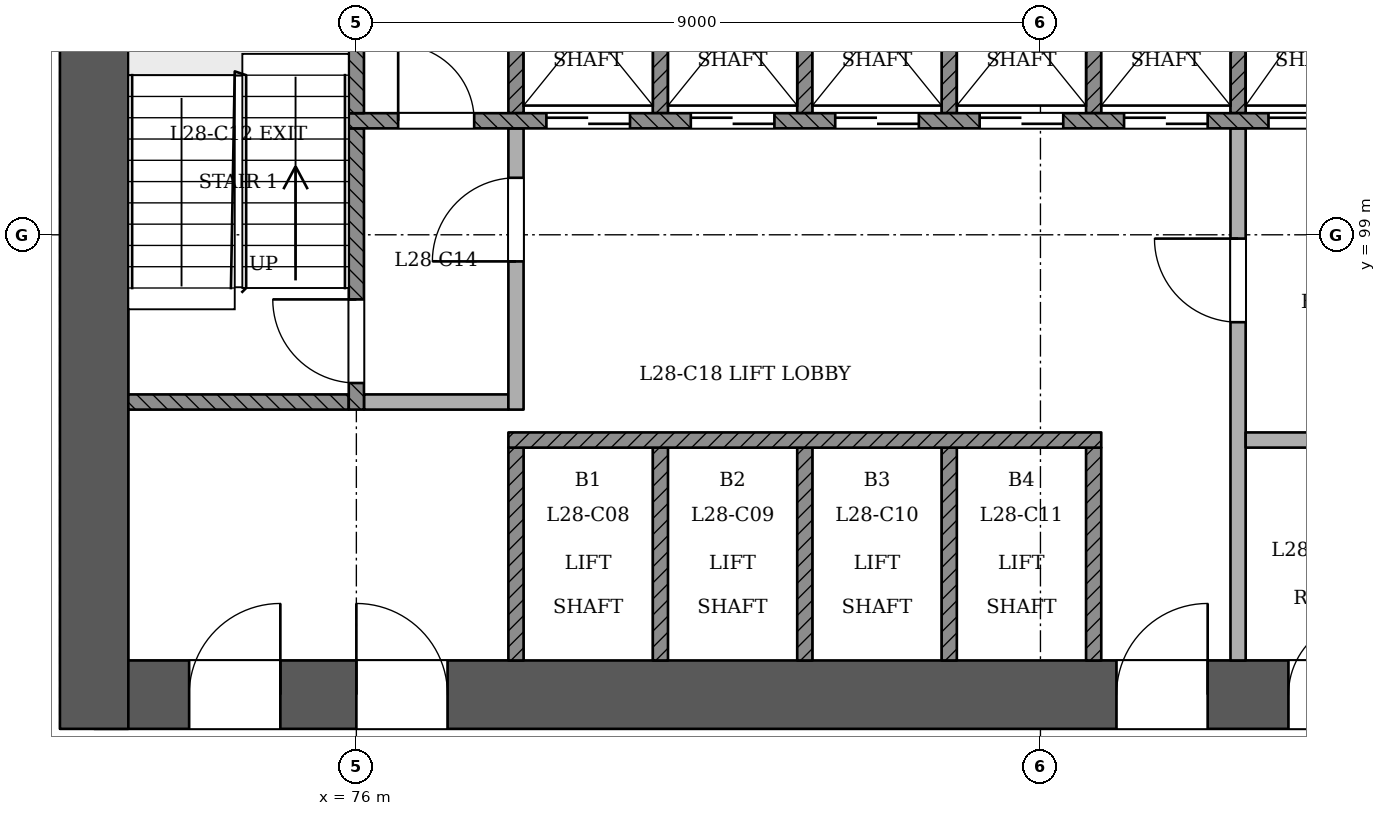
"""IFC4 building model, lengths in metres.
Left out: names, types, materials, properties, quantities, classifications, styles, units other than length and angle.
Written with IfcOpenShell. Run it as: python <this file> out.ifc"""

import sys

from ifc_helpers import new_model, si_unit, direction, frame, frame_2d, origin, place, context, subcontext, project, spatial, rectangle, extrude, element, fill, save


model = new_model("IFC4")
c1 = context("Model", 3, precision=1e-05, world=origin(), true_north=direction((0.0, 1.0)))
c2 = subcontext(c1, "Body", "Model", "MODEL_VIEW")
j1 = project(units=[si_unit("LENGTHUNIT", "METRE"), si_unit("PLANEANGLEUNIT", "RADIAN")], contexts=[c1])
p1 = place(None, origin())
s1 = spatial("IfcSite", under=j1, at=p1, CompositionType="ELEMENT")
p2 = place(p1, origin())
s2 = spatial("IfcBuilding", under=s1, at=p2, CompositionType="ELEMENT")
p3 = place(p2, frame((0.0, 0.0, 111.6)))
s3 = spatial("IfcBuildingStorey", under=s2, at=p3, CompositionType="ELEMENT", Elevation=111.6)
p4 = place(p3, frame((72.55, 92.95, 0.0), z_axis=(0.0, 0.0, 1.0), x_axis=(1.0, 0.0, 0.0)))
e1 = element("IfcWall", 1, at=p4, inside=s3, PredefinedType="SHEAR", context=c2, shape_type="SweptSolid", body=[
    extrude(rectangle(XDim=25.35, YDim=0.9, at=frame_2d((12.675, 0.0))), origin(), (0.0, 0.0, 1.0), 3.6),
])
p5 = place(p4, frame((1.25, 0.0, 0.0)))
e2 = element("IfcOpeningElement", 2, at=p5, cuts=e1, PredefinedType="OPENING", context=c2, shape_type="SweptSolid", body=[
    extrude(rectangle(XDim=1.2, YDim=2.1, at=frame_2d((0.6, 1.05))), frame((0.0, 0.46, 0.0), z_axis=(0.0, -1.0, 0.0), x_axis=(1.0, 0.0, 0.0)), (0.0, 0.0, 1.0), 0.921),
])
p6 = place(p4, frame((3.45, 0.0, 0.0)))
e3 = element("IfcOpeningElement", 3, at=p6, cuts=e1, PredefinedType="OPENING", context=c2, shape_type="SweptSolid", body=[
    extrude(rectangle(XDim=1.2, YDim=2.1, at=frame_2d((0.6, 1.05))), frame((0.0, 0.46, 0.0), z_axis=(0.0, -1.0, 0.0), x_axis=(1.0, 0.0, 0.0)), (0.0, 0.0, 1.0), 0.921),
])
p7 = place(p4, frame((13.45, 0.0, 0.0)))
e4 = element("IfcOpeningElement", 4, at=p7, cuts=e1, PredefinedType="OPENING", context=c2, shape_type="SweptSolid", body=[
    extrude(rectangle(XDim=1.2, YDim=2.1, at=frame_2d((0.6, 1.05))), frame((0.0, 0.46, 0.0), z_axis=(0.0, -1.0, 0.0), x_axis=(1.0, 0.0, 0.0)), (0.0, 0.0, 1.0), 0.921),
])
p8 = place(p4, frame((15.712, 0.0, 0.0)))
e5 = element("IfcOpeningElement", 5, at=p8, cuts=e1, PredefinedType="OPENING", context=c2, shape_type="SweptSolid", body=[
    extrude(rectangle(XDim=1.0, YDim=2.1, at=frame_2d((0.5, 1.05))), frame((0.0, 0.46, 0.0), z_axis=(0.0, -1.0, 0.0), x_axis=(1.0, 0.0, 0.0)), (0.0, 0.0, 1.0), 0.921),
])
p9 = place(p4, frame((18.35, 0.0, 0.0)))
e6 = element("IfcOpeningElement", 6, at=p9, cuts=e1, PredefinedType="OPENING", context=c2, shape_type="SweptSolid", body=[
    extrude(rectangle(XDim=1.0, YDim=2.1, at=frame_2d((0.5, 1.05))), frame((0.0, 0.46, 0.0), z_axis=(0.0, -1.0, 0.0), x_axis=(1.0, 0.0, 0.0)), (0.0, 0.0, 1.0), 0.921),
])
p10 = place(p4, frame((21.938, 0.0, 0.0)))
e7 = element("IfcOpeningElement", 7, at=p10, cuts=e1, PredefinedType="OPENING", context=c2, shape_type="SweptSolid", body=[
    extrude(rectangle(XDim=1.0, YDim=2.1, at=frame_2d((0.5, 1.05))), frame((0.0, 0.46, 0.0), z_axis=(0.0, -1.0, 0.0), x_axis=(1.0, 0.0, 0.0)), (0.0, 0.0, 1.0), 0.921),
])
p11 = place(p3, frame((72.55, 103.85, 0.0), z_axis=(0.0, 0.0, 1.0), x_axis=(0.0, -1.0, 0.0)))
e8 = element("IfcWall", 8, at=p11, inside=s3, PredefinedType="SHEAR", context=c2, shape_type="SweptSolid", body=[
    extrude(rectangle(XDim=11.35, YDim=0.9, at=frame_2d((5.675, 0.0))), origin(), (0.0, 0.0, 1.0), 3.6),
])
p12 = place(p3, frame((63.988, 97.906, 0.0), z_axis=(0.0, 0.0, 1.0), x_axis=(0.500001579174, -0.866024492046, 0.0)))
e9 = element("IfcWall", 9, at=p12, inside=s3, PredefinedType="PARTITIONING", context=c2, shape_type="SweptSolid", body=[
    extrude(rectangle(XDim=41.339, YDim=0.15, at=frame_2d((20.669, 0.0))), origin(), (0.0, 0.0, 1.0), 2.7),
])
p13 = place(p12, frame((0.228, 0.0, 0.0)))
e10 = element("IfcOpeningElement", 10, at=p13, cuts=e9, PredefinedType="OPENING", context=c2, shape_type="SweptSolid", body=[
    extrude(rectangle(XDim=1.2, YDim=2.1, at=frame_2d((0.6, 1.05))), frame((0.0, 0.085, 0.0), z_axis=(0.0, -1.0, 0.0), x_axis=(1.0, 0.0, 0.0)), (0.0, 0.0, 1.0), 0.171),
])
p14 = place(p12, frame((11.07, 0.0, 0.0)))
e11 = element("IfcOpeningElement", 11, at=p14, cuts=e9, PredefinedType="OPENING", context=c2, shape_type="SweptSolid", body=[
    extrude(rectangle(XDim=1.2, YDim=2.1, at=frame_2d((0.6, 1.05))), frame((0.0, 0.085, 0.0), z_axis=(0.0, -1.0, 0.0), x_axis=(1.0, 0.0, 0.0)), (0.0, 0.0, 1.0), 0.171),
])
p15 = place(p12, frame((22.32, 0.0, 0.0)))
e12 = element("IfcOpeningElement", 12, at=p15, cuts=e9, PredefinedType="OPENING", context=c2, shape_type="SweptSolid", body=[
    extrude(rectangle(XDim=1.2, YDim=2.1, at=frame_2d((0.6, 1.05))), frame((0.0, 0.085, 0.0), z_axis=(0.0, -1.0, 0.0), x_axis=(1.0, 0.0, 0.0)), (0.0, 0.0, 1.0), 0.171),
])
p16 = place(p12, frame((32.47, 0.0, 0.0)))
e13 = element("IfcOpeningElement", 13, at=p16, cuts=e9, PredefinedType="OPENING", context=c2, shape_type="SweptSolid", body=[
    extrude(rectangle(XDim=1.2, YDim=2.1, at=frame_2d((0.6, 1.05))), frame((0.0, 0.085, 0.0), z_axis=(0.0, -1.0, 0.0), x_axis=(1.0, 0.0, 0.0)), (0.0, 0.0, 1.0), 0.171),
])
p17 = place(p12, frame((39.758, 0.0, 0.0)))
e14 = element("IfcOpeningElement", 14, at=p17, cuts=e9, PredefinedType="OPENING", context=c2, shape_type="SweptSolid", body=[
    extrude(rectangle(XDim=1.0, YDim=2.1, at=frame_2d((0.5, 1.05))), frame((0.0, 0.085, 0.0), z_axis=(0.0, -1.0, 0.0), x_axis=(1.0, 0.0, 0.0)), (0.0, 0.0, 1.0), 0.171),
])
p18 = place(p3, frame((85.343, 62.105, 0.0), z_axis=(0.0, 0.0, 1.0), x_axis=(0.500001579174, 0.866024492046, 0.0)))
e15 = element("IfcWall", 15, at=p18, inside=s3, PredefinedType="PARTITIONING", context=c2, shape_type="SweptSolid", body=[
    extrude(rectangle(XDim=41.339, YDim=0.15, at=frame_2d((20.669, 0.0))), origin(), (0.0, 0.0, 1.0), 2.7),
])
p19 = place(p18, frame((0.312, 0.0, 0.0)))
e16 = element("IfcOpeningElement", 16, at=p19, cuts=e15, PredefinedType="OPENING", context=c2, shape_type="SweptSolid", body=[
    extrude(rectangle(XDim=1.2, YDim=2.1, at=frame_2d((0.6, 1.05))), frame((0.0, 0.085, 0.0), z_axis=(0.0, -1.0, 0.0), x_axis=(1.0, 0.0, 0.0)), (0.0, 0.0, 1.0), 0.171),
])
p20 = place(p18, frame((8.82, 0.0, 0.0)))
e17 = element("IfcOpeningElement", 17, at=p20, cuts=e15, PredefinedType="OPENING", context=c2, shape_type="SweptSolid", body=[
    extrude(rectangle(XDim=1.2, YDim=2.1, at=frame_2d((0.6, 1.05))), frame((0.0, 0.085, 0.0), z_axis=(0.0, -1.0, 0.0), x_axis=(1.0, 0.0, 0.0)), (0.0, 0.0, 1.0), 0.171),
])
p21 = place(p18, frame((22.32, 0.0, 0.0)))
e18 = element("IfcOpeningElement", 18, at=p21, cuts=e15, PredefinedType="OPENING", context=c2, shape_type="SweptSolid", body=[
    extrude(rectangle(XDim=1.2, YDim=2.1, at=frame_2d((0.6, 1.05))), frame((0.0, 0.085, 0.0), z_axis=(0.0, -1.0, 0.0), x_axis=(1.0, 0.0, 0.0)), (0.0, 0.0, 1.0), 0.171),
])
p22 = place(p18, frame((32.47, 0.0, 0.0)))
e19 = element("IfcOpeningElement", 19, at=p22, cuts=e15, PredefinedType="OPENING", context=c2, shape_type="SweptSolid", body=[
    extrude(rectangle(XDim=1.2, YDim=2.1, at=frame_2d((0.6, 1.05))), frame((0.0, 0.085, 0.0), z_axis=(0.0, -1.0, 0.0), x_axis=(1.0, 0.0, 0.0)), (0.0, 0.0, 1.0), 0.171),
])
p23 = place(p18, frame((39.739, 0.0, 0.0)))
e20 = element("IfcOpeningElement", 20, at=p23, cuts=e15, PredefinedType="OPENING", context=c2, shape_type="SweptSolid", body=[
    extrude(rectangle(XDim=1.0, YDim=2.1, at=frame_2d((0.5, 1.05))), frame((0.0, 0.085, 0.0), z_axis=(0.0, -1.0, 0.0), x_axis=(1.0, 0.0, 0.0)), (0.0, 0.0, 1.0), 0.171),
])
for number, where, z_axis, x_axis in (
    (21, (78.1, 93.4, 0.0), (0.0, 0.0, 1.0), (0.0, 1.0, 0.0)),
    (22, (80.0, 93.4, 0.0), (0.0, 0.0, 1.0), (0.0, 1.0, 0.0)),
    (23, (81.9, 93.4, 0.0), (0.0, 0.0, 1.0), (0.0, 1.0, 0.0)),
    (24, (83.8, 93.4, 0.0), (0.0, 0.0, 1.0), (0.0, 1.0, 0.0)),
    (25, (85.7, 93.4, 0.0), (0.0, 0.0, 1.0), (0.0, 1.0, 0.0)),
):
    element("IfcWall", number, at=place(p3, frame(where, z_axis=z_axis, x_axis=x_axis)), inside=s3, PredefinedType="SOLIDWALL", context=c2, shape_type="SweptSolid", body=[
        extrude(rectangle(XDim=2.8, YDim=0.2, at=frame_2d((1.4, 0.0))), origin(), (0.0, 0.0, 1.0), 3.1),
    ])
p24 = place(p3, frame((87.6, 93.4, 0.0), z_axis=(0.0, 0.0, 1.0), x_axis=(0.0, 1.0, 0.0)))
e26 = element("IfcWall", 26, at=p24, inside=s3, PredefinedType="PARTITIONING", context=c2, shape_type="SweptSolid", body=[
    extrude(rectangle(XDim=7.0, YDim=0.2, at=frame_2d((3.5, 0.0))), origin(), (0.0, 0.0, 1.0), 3.1),
])
p25 = place(p24, frame((4.45, 0.0, 0.0)))
e27 = element("IfcOpeningElement", 27, at=p25, cuts=e26, PredefinedType="OPENING", context=c2, shape_type="SweptSolid", body=[
    extrude(rectangle(XDim=1.1, YDim=2.1, at=frame_2d((0.55, 1.05))), frame((0.0, 0.11, 0.0), z_axis=(0.0, -1.0, 0.0), x_axis=(1.0, 0.0, 0.0)), (0.0, 0.0, 1.0), 0.221),
])
p26 = place(p3, frame((78.0, 96.3, 0.0), z_axis=(0.0, 0.0, 1.0), x_axis=(1.0, 0.0, 0.0)))
e28 = element("IfcWall", 28, at=p26, inside=s3, PredefinedType="SOLIDWALL", context=c2, shape_type="SweptSolid", body=[
    extrude(rectangle(XDim=7.8, YDim=0.2, at=frame_2d((3.9, 0.0))), origin(), (0.0, 0.0, 1.0), 3.1),
])
p27 = place(p3, frame((87.7, 96.3, 0.0), z_axis=(0.0, 0.0, 1.0), x_axis=(1.0, 0.0, 0.0)))
e29 = element("IfcWall", 29, at=p27, inside=s3, PredefinedType="PARTITIONING", context=c2, shape_type="SweptSolid", body=[
    extrude(rectangle(XDim=3.6, YDim=0.2, at=frame_2d((1.8, 0.0))), origin(), (0.0, 0.0, 1.0), 3.1),
])
p28 = place(p3, frame((73.0, 96.8, 0.0), z_axis=(0.0, 0.0, 1.0), x_axis=(1.0, 0.0, 0.0)))
e30 = element("IfcWall", 30, at=p28, inside=s3, PredefinedType="SOLIDWALL", context=c2, shape_type="SweptSolid", body=[
    extrude(rectangle(XDim=2.9, YDim=0.2, at=frame_2d((1.45, 0.0))), origin(), (0.0, 0.0, 1.0), 3.1),
])
p29 = place(p3, frame((76.0, 96.7, 0.0), z_axis=(0.0, 0.0, 1.0), x_axis=(0.0, 1.0, 0.0)))
e31 = element("IfcWall", 31, at=p29, inside=s3, PredefinedType="SOLIDWALL", context=c2, shape_type="SweptSolid", body=[
    extrude(rectangle(XDim=3.7, YDim=0.2, at=frame_2d((1.85, 0.0))), origin(), (0.0, 0.0, 1.0), 3.1),
])
p30 = place(p29, frame((0.35, 0.0, 0.0)))
e32 = element("IfcOpeningElement", 32, at=p30, cuts=e31, PredefinedType="OPENING", context=c2, shape_type="SweptSolid", body=[
    extrude(rectangle(XDim=1.1, YDim=2.1, at=frame_2d((0.55, 1.05))), frame((0.0, 0.11, 0.0), z_axis=(0.0, -1.0, 0.0), x_axis=(1.0, 0.0, 0.0)), (0.0, 0.0, 1.0), 0.221),
])
p31 = place(p3, frame((76.1, 96.8, 0.0), z_axis=(0.0, 0.0, 1.0), x_axis=(1.0, 0.0, 0.0)))
e33 = element("IfcWall", 33, at=p31, inside=s3, PredefinedType="PARTITIONING", context=c2, shape_type="SweptSolid", body=[
    extrude(rectangle(XDim=1.9, YDim=0.2, at=frame_2d((0.95, 0.0))), origin(), (0.0, 0.0, 1.0), 3.1),
])
p32 = place(p3, frame((78.1, 96.7, 0.0), z_axis=(0.0, 0.0, 1.0), x_axis=(0.0, 1.0, 0.0)))
e34 = element("IfcWall", 34, at=p32, inside=s3, PredefinedType="PARTITIONING", context=c2, shape_type="SweptSolid", body=[
    extrude(rectangle(XDim=3.7, YDim=0.2, at=frame_2d((1.85, 0.0))), origin(), (0.0, 0.0, 1.0), 3.1),
])
p33 = place(p32, frame((1.95, 0.0, 0.0)))
e35 = element("IfcOpeningElement", 35, at=p33, cuts=e34, PredefinedType="OPENING", context=c2, shape_type="SweptSolid", body=[
    extrude(rectangle(XDim=1.1, YDim=2.1, at=frame_2d((0.55, 1.05))), frame((0.0, 0.11, 0.0), z_axis=(0.0, -1.0, 0.0), x_axis=(1.0, 0.0, 0.0)), (0.0, 0.0, 1.0), 0.221),
])
p34 = place(p3, frame((75.9, 100.5, 0.0), z_axis=(0.0, 0.0, 1.0), x_axis=(1.0, 0.0, 0.0)))
e36 = element("IfcWall", 36, at=p34, inside=s3, PredefinedType="SOLIDWALL", context=c2, shape_type="SweptSolid", body=[
    extrude(rectangle(XDim=18.2, YDim=0.2, at=frame_2d((9.1, 0.0))), origin(), (0.0, 0.0, 1.0), 3.1),
])
p35 = place(p34, frame((2.6, 0.0, 0.0)))
e37 = element("IfcOpeningElement", 37, at=p35, cuts=e36, PredefinedType="OPENING", context=c2, shape_type="SweptSolid", body=[
    extrude(rectangle(XDim=1.1, YDim=2.1, at=frame_2d((0.55, 1.05))), frame((0.0, 0.11, 0.0), z_axis=(0.0, -1.0, 0.0), x_axis=(1.0, 0.0, 0.0)), (0.0, 0.0, 1.0), 0.221),
])
p36 = place(p34, frame((4.5, 0.0, 0.0)))
e38 = element("IfcOpeningElement", 38, at=p36, cuts=e36, PredefinedType="OPENING", context=c2, shape_type="SweptSolid", body=[
    extrude(rectangle(XDim=1.1, YDim=2.1, at=frame_2d((0.55, 1.05))), frame((0.0, 0.11, 0.0), z_axis=(0.0, -1.0, 0.0), x_axis=(1.0, 0.0, 0.0)), (0.0, 0.0, 1.0), 0.221),
])
p37 = place(p34, frame((6.4, 0.0, 0.0)))
e39 = element("IfcOpeningElement", 39, at=p37, cuts=e36, PredefinedType="OPENING", context=c2, shape_type="SweptSolid", body=[
    extrude(rectangle(XDim=1.1, YDim=2.1, at=frame_2d((0.55, 1.05))), frame((0.0, 0.11, 0.0), z_axis=(0.0, -1.0, 0.0), x_axis=(1.0, 0.0, 0.0)), (0.0, 0.0, 1.0), 0.221),
])
p38 = place(p34, frame((8.3, 0.0, 0.0)))
e40 = element("IfcOpeningElement", 40, at=p38, cuts=e36, PredefinedType="OPENING", context=c2, shape_type="SweptSolid", body=[
    extrude(rectangle(XDim=1.1, YDim=2.1, at=frame_2d((0.55, 1.05))), frame((0.0, 0.11, 0.0), z_axis=(0.0, -1.0, 0.0), x_axis=(1.0, 0.0, 0.0)), (0.0, 0.0, 1.0), 0.221),
])
p39 = place(p34, frame((10.2, 0.0, 0.0)))
e41 = element("IfcOpeningElement", 41, at=p39, cuts=e36, PredefinedType="OPENING", context=c2, shape_type="SweptSolid", body=[
    extrude(rectangle(XDim=1.1, YDim=2.1, at=frame_2d((0.55, 1.05))), frame((0.0, 0.11, 0.0), z_axis=(0.0, -1.0, 0.0), x_axis=(1.0, 0.0, 0.0)), (0.0, 0.0, 1.0), 0.221),
])
p40 = place(p34, frame((12.1, 0.0, 0.0)))
e42 = element("IfcOpeningElement", 42, at=p40, cuts=e36, PredefinedType="OPENING", context=c2, shape_type="SweptSolid", body=[
    extrude(rectangle(XDim=1.1, YDim=2.1, at=frame_2d((0.55, 1.05))), frame((0.0, 0.11, 0.0), z_axis=(0.0, -1.0, 0.0), x_axis=(1.0, 0.0, 0.0)), (0.0, 0.0, 1.0), 0.221),
])
p41 = place(p34, frame((14.0, 0.0, 0.0)))
e43 = element("IfcOpeningElement", 43, at=p41, cuts=e36, PredefinedType="OPENING", context=c2, shape_type="SweptSolid", body=[
    extrude(rectangle(XDim=1.1, YDim=2.1, at=frame_2d((0.55, 1.05))), frame((0.0, 0.11, 0.0), z_axis=(0.0, -1.0, 0.0), x_axis=(1.0, 0.0, 0.0)), (0.0, 0.0, 1.0), 0.221),
])
p42 = place(p34, frame((0.65, 0.0, 0.0)))
e44 = element("IfcOpeningElement", 44, at=p42, cuts=e36, PredefinedType="OPENING", context=c2, shape_type="SweptSolid", body=[
    extrude(rectangle(XDim=1.0, YDim=2.1, at=frame_2d((0.5, 1.05))), frame((0.0, 0.11, 0.0), z_axis=(0.0, -1.0, 0.0), x_axis=(1.0, 0.0, 0.0)), (0.0, 0.0, 1.0), 0.221),
])
p43 = place(p34, frame((16.3, 0.0, 0.0)))
e45 = element("IfcOpeningElement", 45, at=p43, cuts=e36, PredefinedType="OPENING", context=c2, shape_type="SweptSolid", body=[
    extrude(rectangle(XDim=1.0, YDim=2.1, at=frame_2d((0.5, 1.05))), frame((0.0, 0.11, 0.0), z_axis=(0.0, -1.0, 0.0), x_axis=(1.0, 0.0, 0.0)), (0.0, 0.0, 1.0), 0.221),
])
for number, where, z_axis, x_axis in (
    (46, (76.0, 100.6, 0.0), (0.0, 0.0, 1.0), (0.0, 1.0, 0.0)),
    (47, (78.1, 100.6, 0.0), (0.0, 0.0, 1.0), (0.0, 1.0, 0.0)),
    (48, (80.0, 100.6, 0.0), (0.0, 0.0, 1.0), (0.0, 1.0, 0.0)),
    (49, (81.9, 100.6, 0.0), (0.0, 0.0, 1.0), (0.0, 1.0, 0.0)),
    (50, (83.8, 100.6, 0.0), (0.0, 0.0, 1.0), (0.0, 1.0, 0.0)),
    (51, (85.7, 100.6, 0.0), (0.0, 0.0, 1.0), (0.0, 1.0, 0.0)),
    (52, (87.6, 100.6, 0.0), (0.0, 0.0, 1.0), (0.0, 1.0, 0.0)),
):
    element("IfcWall", number, at=place(p3, frame(where, z_axis=z_axis, x_axis=x_axis)), inside=s3, PredefinedType="SOLIDWALL", context=c2, shape_type="SweptSolid", body=[
        extrude(rectangle(XDim=2.8, YDim=0.2, at=frame_2d((1.4, 0.0))), origin(), (0.0, 0.0, 1.0), 3.1),
    ])
p44 = place(p35, origin())
e53 = element("IfcDoor", 53, at=p44, inside=s3, OperationType="SLIDING_TO_RIGHT", PredefinedType="NOTDEFINED", context=c2, shape_type="SweptSolid", body=[
    extrude(rectangle(XDim=1.1, YDim=2.1, at=frame_2d((0.55, 1.05))), frame((0.0, 0.025, 0.0), z_axis=(0.0, -1.0, 0.0), x_axis=(1.0, 0.0, 0.0)), (0.0, 0.0, 1.0), 0.05),
])
fill(e37, e53)
p45 = place(p36, origin())
e54 = element("IfcDoor", 54, at=p45, inside=s3, OperationType="SLIDING_TO_LEFT", PredefinedType="NOTDEFINED", context=c2, shape_type="SweptSolid", body=[
    extrude(rectangle(XDim=1.1, YDim=2.1, at=frame_2d((0.55, 1.05))), frame((0.0, 0.025, 0.0), z_axis=(0.0, -1.0, 0.0), x_axis=(1.0, 0.0, 0.0)), (0.0, 0.0, 1.0), 0.05),
])
fill(e38, e54)
p46 = place(p37, origin())
e55 = element("IfcDoor", 55, at=p46, inside=s3, OperationType="SLIDING_TO_RIGHT", PredefinedType="NOTDEFINED", context=c2, shape_type="SweptSolid", body=[
    extrude(rectangle(XDim=1.1, YDim=2.1, at=frame_2d((0.55, 1.05))), frame((0.0, 0.025, 0.0), z_axis=(0.0, -1.0, 0.0), x_axis=(1.0, 0.0, 0.0)), (0.0, 0.0, 1.0), 0.05),
])
fill(e39, e55)
p47 = place(p38, origin())
e56 = element("IfcDoor", 56, at=p47, inside=s3, OperationType="SLIDING_TO_LEFT", PredefinedType="NOTDEFINED", context=c2, shape_type="SweptSolid", body=[
    extrude(rectangle(XDim=1.1, YDim=2.1, at=frame_2d((0.55, 1.05))), frame((0.0, 0.025, 0.0), z_axis=(0.0, -1.0, 0.0), x_axis=(1.0, 0.0, 0.0)), (0.0, 0.0, 1.0), 0.05),
])
fill(e40, e56)
p48 = place(p39, origin())
e57 = element("IfcDoor", 57, at=p48, inside=s3, OperationType="SLIDING_TO_RIGHT", PredefinedType="NOTDEFINED", context=c2, shape_type="SweptSolid", body=[
    extrude(rectangle(XDim=1.1, YDim=2.1, at=frame_2d((0.55, 1.05))), frame((0.0, 0.025, 0.0), z_axis=(0.0, -1.0, 0.0), x_axis=(1.0, 0.0, 0.0)), (0.0, 0.0, 1.0), 0.05),
])
fill(e41, e57)
p49 = place(p40, origin())
e58 = element("IfcDoor", 58, at=p49, inside=s3, OperationType="SLIDING_TO_RIGHT", PredefinedType="NOTDEFINED", context=c2, shape_type="SweptSolid", body=[
    extrude(rectangle(XDim=1.1, YDim=2.1, at=frame_2d((0.55, 1.05))), frame((0.0, 0.025, 0.0), z_axis=(0.0, -1.0, 0.0), x_axis=(1.0, 0.0, 0.0)), (0.0, 0.0, 1.0), 0.05),
])
fill(e42, e58)
p50 = place(p30, origin())
e59 = element("IfcDoor", 59, at=p50, inside=s3, OperationType="SINGLE_SWING_RIGHT", PredefinedType="NOTDEFINED", context=c2, shape_type="SweptSolid", body=[
    extrude(rectangle(XDim=1.1, YDim=2.1, at=frame_2d((0.55, 1.05))), frame((0.0, 0.025, 0.0), z_axis=(0.0, -1.0, 0.0), x_axis=(1.0, 0.0, 0.0)), (0.0, 0.0, 1.0), 0.05),
])
fill(e32, e59)
p51 = place(p33, origin())
e60 = element("IfcDoor", 60, at=p51, inside=s3, OperationType="SINGLE_SWING_LEFT", PredefinedType="NOTDEFINED", context=c2, shape_type="SweptSolid", body=[
    extrude(rectangle(XDim=1.1, YDim=2.1, at=frame_2d((0.55, 1.05))), frame((0.0, 0.025, 0.0), z_axis=(0.0, -1.0, 0.0), x_axis=(1.0, 0.0, 0.0)), (0.0, 0.0, 1.0), 0.05),
])
fill(e35, e60)
p52 = place(p25, origin())
e61 = element("IfcDoor", 61, at=p52, inside=s3, OperationType="SINGLE_SWING_RIGHT", PredefinedType="NOTDEFINED", context=c2, shape_type="SweptSolid", body=[
    extrude(rectangle(XDim=1.1, YDim=2.1, at=frame_2d((0.55, 1.05))), frame((0.0, 0.025, 0.0), z_axis=(0.0, -1.0, 0.0), x_axis=(1.0, 0.0, 0.0)), (0.0, 0.0, 1.0), 0.05),
])
fill(e27, e61)
p53 = place(p5, origin())
e62 = element("IfcDoor", 62, at=p53, inside=s3, OperationType="SINGLE_SWING_RIGHT", PredefinedType="NOTDEFINED", context=c2, shape_type="SweptSolid", body=[
    extrude(rectangle(XDim=1.2, YDim=2.1, at=frame_2d((0.6, 1.05))), frame((0.0, 0.025, 0.0), z_axis=(0.0, -1.0, 0.0), x_axis=(1.0, 0.0, 0.0)), (0.0, 0.0, 1.0), 0.05),
])
fill(e2, e62)
p54 = place(p6, origin())
e63 = element("IfcDoor", 63, at=p54, inside=s3, OperationType="SINGLE_SWING_LEFT", PredefinedType="NOTDEFINED", context=c2, shape_type="SweptSolid", body=[
    extrude(rectangle(XDim=1.2, YDim=2.1, at=frame_2d((0.6, 1.05))), frame((0.0, 0.025, 0.0), z_axis=(0.0, -1.0, 0.0), x_axis=(1.0, 0.0, 0.0)), (0.0, 0.0, 1.0), 0.05),
])
fill(e3, e63)
p55 = place(p7, origin())
e64 = element("IfcDoor", 64, at=p55, inside=s3, OperationType="SINGLE_SWING_RIGHT", PredefinedType="NOTDEFINED", context=c2, shape_type="SweptSolid", body=[
    extrude(rectangle(XDim=1.2, YDim=2.1, at=frame_2d((0.6, 1.05))), frame((0.0, 0.025, 0.0), z_axis=(0.0, -1.0, 0.0), x_axis=(1.0, 0.0, 0.0)), (0.0, 0.0, 1.0), 0.05),
])
fill(e4, e64)
p56 = place(p42, origin())
e65 = element("IfcDoor", 65, at=p56, inside=s3, OperationType="SINGLE_SWING_LEFT", PredefinedType="NOTDEFINED", context=c2, shape_type="SweptSolid", body=[
    extrude(rectangle(XDim=1.0, YDim=2.1, at=frame_2d((0.5, 1.05))), frame((0.0, 0.025, 0.0), z_axis=(0.0, -1.0, 0.0), x_axis=(1.0, 0.0, 0.0)), (0.0, 0.0, 1.0), 0.05),
])
fill(e44, e65)
p57 = place(p8, origin())
e66 = element("IfcDoor", 66, at=p57, inside=s3, OperationType="SINGLE_SWING_RIGHT", PredefinedType="NOTDEFINED", context=c2, shape_type="SweptSolid", body=[
    extrude(rectangle(XDim=1.0, YDim=2.1, at=frame_2d((0.5, 1.05))), frame((0.0, 0.025, 0.0), z_axis=(0.0, -1.0, 0.0), x_axis=(1.0, 0.0, 0.0)), (0.0, 0.0, 1.0), 0.05),
])
fill(e5, e66)
save(model, sys.argv[1])
